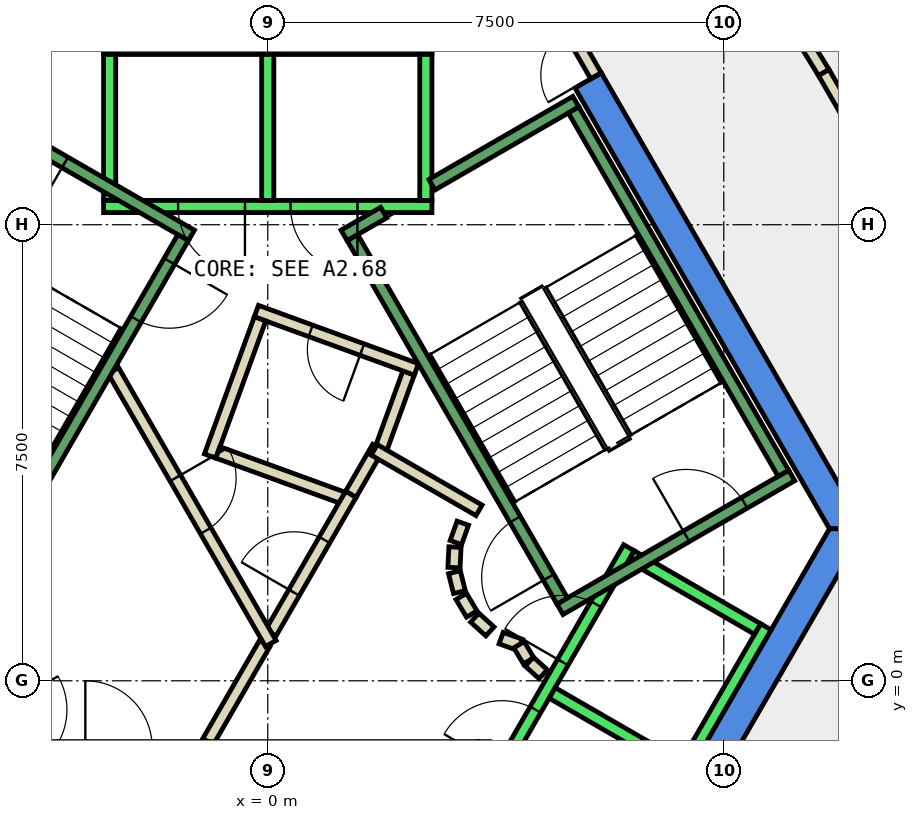
"""IFC4 building model, lengths in metres.
Left out: names, types, materials, properties, quantities, classifications, styles, units other than length and angle.
Written with IfcOpenShell. Run it as: python <this file> out.ifc"""

import sys

from ifc_helpers import new_model, si_unit, direction, frame, frame_2d, origin, place, context, subcontext, project, spatial, polyline, rectangle, outline, extrude, element, fill, save


model = new_model("IFC4")
c1 = context("Model", 3, precision=1e-05, world=origin(), true_north=direction((0.0, 1.0)))
c2 = subcontext(c1, "Body", "Model", "MODEL_VIEW")
j1 = project(units=[si_unit("LENGTHUNIT", "METRE"), si_unit("PLANEANGLEUNIT", "RADIAN")], contexts=[c1])
p1 = place(None, origin())
s1 = spatial("IfcSite", under=j1, at=p1, CompositionType="ELEMENT")
p2 = place(p1, origin())
s2 = spatial("IfcBuilding", under=s1, at=p2, CompositionType="ELEMENT")
p3 = place(p2, frame((0.0, 0.0, 322.4)))
s3 = spatial("IfcBuildingStorey", under=s2, at=p3, CompositionType="ELEMENT", Elevation=322.4)
p4 = place(p3, frame((0.0, 0.0, -0.34)))
e1 = element("IfcWall", 1, at=p4, inside=s3, PredefinedType="SHEAR", context=c2, shape_type="SweptSolid", body=[
    extrude(outline(polyline([(5.486, 9.998), (5.053, 9.748), (9.238, 2.5), (9.815, 2.5), (5.486, 9.998)])), origin(), (0.0, 0.0, 1.0), 3.34),
])
p5 = place(p3, frame((0.0, 0.0, -0.34)))
e2 = element("IfcWall", 2, at=p5, inside=s3, PredefinedType="SHEAR", context=c2, shape_type="SweptSolid", body=[
    extrude(outline(polyline([(4.907, -6.0), (9.815, 2.5), (9.238, 2.5), (4.619, -5.5), (4.907, -6.0)])), origin(), (0.0, 0.0, 1.0), 3.34),
])
p6 = place(p3, frame((1.366, 3.066, 0.0), z_axis=(0.0, 0.0, 1.0), x_axis=(0.499698775601, 0.866199245938, 0.0)))
e3 = element("IfcWall", 3, at=p6, inside=s3, PredefinedType="PARTITIONING", context=c2, shape_type="SweptSolid", body=[
    extrude(rectangle(XDim=0.893, YDim=0.2, at=frame_2d((0.446, 0.0))), origin(), (0.0, 0.0, 1.0), 3.0),
])
p7 = place(p3, frame((1.838, 3.748, 0.0), z_axis=(0.0, 0.0, 1.0), x_axis=(0.341883255813, 0.939742432475, 0.0)))
e4 = element("IfcWall", 4, at=p7, inside=s3, PredefinedType="PARTITIONING", context=c2, shape_type="SweptSolid", body=[
    extrude(rectangle(XDim=1.398, YDim=0.2, at=frame_2d((0.699, 0.0))), origin(), (0.0, 0.0, 1.0), 3.0),
])
p8 = place(p3, frame((2.444, 5.122, 0.0), z_axis=(0.0, 0.0, 1.0), x_axis=(-0.939650782256, 0.342135071873, 0.0)))
e5 = element("IfcWall", 5, at=p8, inside=s3, PredefinedType="PARTITIONING", context=c2, shape_type="SweptSolid", body=[
    extrude(rectangle(XDim=2.8, YDim=0.2, at=frame_2d((1.4, 0.0))), origin(), (0.0, 0.0, 1.0), 3.0),
])
p9 = place(p8, frame((0.95, 0.0, 0.0)))
e6 = element("IfcOpeningElement", 6, at=p9, cuts=e5, PredefinedType="OPENING", context=c2, shape_type="SweptSolid", body=[
    extrude(rectangle(XDim=0.9, YDim=2.1, at=frame_2d((0.45, 1.05))), frame((0.0, 0.11, 0.0), z_axis=(0.0, -1.0, 0.0), x_axis=(1.0, 0.0, 0.0)), (0.0, 0.0, 1.0), 0.22),
])
p10 = place(p3, frame((-0.127, 5.952, 0.0), z_axis=(0.0, 0.0, 1.0), x_axis=(-0.342012513308, -0.93969539785, 0.0)))
e7 = element("IfcWall", 7, at=p10, inside=s3, PredefinedType="PARTITIONING", context=c2, shape_type="SweptSolid", body=[
    extrude(rectangle(XDim=2.401, YDim=0.2, at=frame_2d((1.2, 0.0))), origin(), (0.0, 0.0, 1.0), 3.0),
])
p11 = place(p3, frame((-0.82, 3.756, 0.0), z_axis=(0.0, 0.0, 1.0), x_axis=(0.939740098492, -0.34188967122, 0.0)))
e8 = element("IfcWall", 8, at=p11, inside=s3, PredefinedType="PARTITIONING", context=c2, shape_type="SweptSolid", body=[
    extrude(rectangle(XDim=2.273, YDim=0.2, at=frame_2d((1.136, 0.0))), origin(), (0.0, 0.0, 1.0), 3.0),
])
p12 = place(p3, frame((4.922, 16.867, 0.0), z_axis=(0.0, 0.0, 1.0), x_axis=(0.523943621984, -0.851752945978, 0.0)))
e9 = element("IfcWall", 9, at=p12, inside=s3, PredefinedType="PARTITIONING", context=c2, shape_type="SweptSolid", body=[
    extrude(rectangle(XDim=8.06, YDim=0.2, at=frame_2d((4.03, 0.0))), origin(), (0.0, 0.0, 1.0), 3.0),
])
p13 = place(p3, frame((9.145, 10.002, 0.0), z_axis=(0.0, 0.0, 1.0), x_axis=(0.499798886082, -0.866141485827, 0.0)))
e10 = element("IfcWall", 10, at=p13, inside=s3, PredefinedType="PARTITIONING", context=c2, shape_type="SweptSolid", body=[
    extrude(rectangle(XDim=1.198, YDim=0.2, at=frame_2d((0.599, 0.0))), origin(), (0.0, 0.0, 1.0), 3.0),
])
p14 = place(p3, frame((-0.982, -1.0, 0.0), z_axis=(0.0, 0.0, 1.0), x_axis=(0.50024047865, 0.865886518847, 0.0)))
e11 = element("IfcWall", 11, at=p14, inside=s3, PredefinedType="PARTITIONING", context=c2, shape_type="SweptSolid", body=[
    extrude(rectangle(XDim=1.863, YDim=0.2, at=frame_2d((0.931, 0.0))), origin(), (0.0, 0.0, 1.0), 3.0),
])
p15 = place(p3, frame((0.05, 0.787, 0.0), z_axis=(0.0, 0.0, 1.0), x_axis=(0.500070457302, 0.865984721421, 0.0)))
e12 = element("IfcWall", 12, at=p15, inside=s3, PredefinedType="PARTITIONING", context=c2, shape_type="SweptSolid", body=[
    extrude(rectangle(XDim=2.631, YDim=0.2, at=frame_2d((1.316, 0.0))), origin(), (0.0, 0.0, 1.0), 3.0),
])
p16 = place(p15, frame((0.766, 0.0, 0.0)))
e13 = element("IfcOpeningElement", 13, at=p16, cuts=e12, PredefinedType="OPENING", context=c2, shape_type="SweptSolid", body=[
    extrude(rectangle(XDim=1.0, YDim=2.1, at=frame_2d((0.5, 1.05))), frame((0.0, 0.11, 0.0), z_axis=(0.0, -1.0, 0.0), x_axis=(1.0, 0.0, 0.0)), (0.0, 0.0, 1.0), 0.22),
])
p17 = place(p3, frame((1.751, 3.798, 0.0), z_axis=(0.0, 0.0, 1.0), x_axis=(0.866091650241, -0.499885240213, 0.0)))
e14 = element("IfcWall", 14, at=p17, inside=s3, PredefinedType="PARTITIONING", context=c2, shape_type="SweptSolid", body=[
    extrude(rectangle(XDim=1.991, YDim=0.2, at=frame_2d((0.995, 0.0))), origin(), (0.0, 0.0, 1.0), 3.0),
])
p18 = place(p3, frame((3.208, 2.592, 0.0), z_axis=(0.0, 0.0, 1.0), x_axis=(-0.337388820924, -0.941365382578, 0.0)))
e15 = element("IfcWall", 15, at=p18, inside=s3, PredefinedType="PARTITIONING", context=c2, shape_type="SweptSolid", body=[
    extrude(rectangle(XDim=0.338, YDim=0.2, at=frame_2d((0.169, 0.0))), origin(), (0.0, 0.0, 1.0), 3.0),
])
p19 = place(p3, frame((3.079, 2.199, 0.0), z_axis=(0.0, 0.0, 1.0), x_axis=(-0.047771483479, -0.998858290933, 0.0)))
e16 = element("IfcWall", 16, at=p19, inside=s3, PredefinedType="PARTITIONING", context=c2, shape_type="SweptSolid", body=[
    extrude(rectangle(XDim=0.337, YDim=0.2, at=frame_2d((0.169, 0.0))), origin(), (0.0, 0.0, 1.0), 3.0),
])
p20 = place(p3, frame((3.07, 1.786, 0.0), z_axis=(0.0, 0.0, 1.0), x_axis=(0.242705583207, -0.970099994784, 0.0)))
e17 = element("IfcWall", 17, at=p20, inside=s3, PredefinedType="PARTITIONING", context=c2, shape_type="SweptSolid", body=[
    extrude(rectangle(XDim=0.338, YDim=0.2, at=frame_2d((0.169, 0.0))), origin(), (0.0, 0.0, 1.0), 3.0),
])
for number, where, z_axis, x_axis in (
    (18, (3.182, 1.388, 0.0), (0.0, 0.0, 1.0), (0.512, -0.859, 0.0)),
    (19, (3.404, 1.039, 0.0), (0.0, 0.0, 1.0), (0.74, -0.672, 0.0)),
):
    element("IfcWall", number, at=place(p3, frame(where, z_axis=z_axis, x_axis=x_axis)), inside=s3, PredefinedType="PARTITIONING", context=c2, shape_type="SweptSolid", body=[
        extrude(rectangle(XDim=0.338, YDim=0.2, at=frame_2d((0.169, 0.0))), origin(), (0.0, 0.0, 1.0), 3.0),
    ])
p21 = place(p3, frame((3.838, 0.702, 0.0), z_axis=(0.0, 0.0, 1.0), x_axis=(0.941035081519, -0.338308993895, 0.0)))
e20 = element("IfcWall", 20, at=p21, inside=s3, PredefinedType="PARTITIONING", context=c2, shape_type="SweptSolid", body=[
    extrude(rectangle(XDim=0.337, YDim=0.2, at=frame_2d((0.168, 0.0))), origin(), (0.0, 0.0, 1.0), 3.0),
])
p22 = place(p3, frame((4.132, 0.593, 0.0), z_axis=(0.0, 0.0, 1.0), x_axis=(0.513561617048, -0.858052717201, 0.0)))
e21 = element("IfcWall", 21, at=p22, inside=s3, PredefinedType="PARTITIONING", context=c2, shape_type="SweptSolid", body=[
    extrude(rectangle(XDim=0.308, YDim=0.2, at=frame_2d((0.154, 0.0))), origin(), (0.0, 0.0, 1.0), 3.0),
])
p23 = place(p3, frame((4.301, 0.315, 0.0), z_axis=(0.0, 0.0, 1.0), x_axis=(0.741798017506, -0.670623367639, 0.0)))
e22 = element("IfcWall", 22, at=p23, inside=s3, PredefinedType="PARTITIONING", context=c2, shape_type="SweptSolid", body=[
    extrude(rectangle(XDim=0.309, YDim=0.2, at=frame_2d((0.154, 0.0))), origin(), (0.0, 0.0, 1.0), 3.0),
])
p24 = place(p3, frame((-2.54, 5.1, 0.0), z_axis=(0.0, 0.0, 1.0), x_axis=(0.499925051871, -0.866068670783, 0.0)))
e23 = element("IfcWall", 23, at=p24, inside=s3, PredefinedType="PARTITIONING", context=c2, shape_type="SweptSolid", body=[
    extrude(rectangle(XDim=5.181, YDim=0.2, at=frame_2d((2.59, 0.0))), origin(), (0.0, 0.0, 1.0), 3.0),
])
p25 = place(p24, frame((2.04, 0.0, 0.0)))
e24 = element("IfcOpeningElement", 24, at=p25, cuts=e23, PredefinedType="OPENING", context=c2, shape_type="SweptSolid", body=[
    extrude(rectangle(XDim=1.0, YDim=2.1, at=frame_2d((0.5, 1.05))), frame((0.0, 0.11, 0.0), z_axis=(0.0, -1.0, 0.0), x_axis=(1.0, 0.0, 0.0)), (0.0, 0.0, 1.0), 0.22),
])
p26 = place(p3, frame((5.399, 9.948, 0.0), z_axis=(0.0, 0.0, 1.0), x_axis=(-0.499882215713, 0.866093395895, 0.0)))
e25 = element("IfcWall", 25, at=p26, inside=s3, PredefinedType="PARTITIONING", context=c2, shape_type="SweptSolid", body=[
    extrude(rectangle(XDim=0.926, YDim=0.2, at=frame_2d((0.463, 0.0))), origin(), (0.0, 0.0, 1.0), 2.4),
])
p27 = place(p26, frame((0.017, 0.0, 0.0)))
e26 = element("IfcOpeningElement", 26, at=p27, cuts=e25, PredefinedType="OPENING", context=c2, shape_type="SweptSolid", body=[
    extrude(rectangle(XDim=0.9, YDim=2.1, at=frame_2d((0.45, 1.05))), frame((0.0, 0.11, 0.0), z_axis=(0.0, -1.0, 0.0), x_axis=(1.0, 0.0, 0.0)), (0.0, 0.0, 1.0), 0.22),
])
p28 = place(p3, frame((2.7, 7.8, 0.0), z_axis=(0.0, 0.0, 1.0), x_axis=(-1.0, 0.0, 0.0)))
e27 = element("IfcWall", 27, at=p28, inside=s3, PredefinedType="STANDARD", context=c2, shape_type="SweptSolid", body=[
    extrude(rectangle(XDim=5.4, YDim=0.2, at=frame_2d((2.7, 0.0))), origin(), (0.0, 0.0, 1.0), 3.0),
])
p29 = place(p28, frame((1.225, 0.0, 0.0)))
e28 = element("IfcOpeningElement", 28, at=p29, cuts=e27, PredefinedType="OPENING", context=c2, shape_type="SweptSolid", body=[
    extrude(rectangle(XDim=1.1, YDim=2.1, at=frame_2d((0.55, 1.05))), frame((0.0, 0.11, 0.0), z_axis=(0.0, -1.0, 0.0), x_axis=(1.0, 0.0, 0.0)), (0.0, 0.0, 1.0), 0.22),
])
p30 = place(p28, frame((3.075, 0.0, 0.0)))
e29 = element("IfcOpeningElement", 29, at=p30, cuts=e27, PredefinedType="OPENING", context=c2, shape_type="SweptSolid", body=[
    extrude(rectangle(XDim=1.1, YDim=2.1, at=frame_2d((0.55, 1.05))), frame((0.0, 0.11, 0.0), z_axis=(0.0, -1.0, 0.0), x_axis=(1.0, 0.0, 0.0)), (0.0, 0.0, 1.0), 0.22),
])
p31 = place(p3, frame((2.7, 10.4, 0.0), z_axis=(0.0, 0.0, 1.0), x_axis=(-1.0, 0.0, 0.0)))
e30 = element("IfcWall", 30, at=p31, inside=s3, PredefinedType="STANDARD", context=c2, shape_type="SweptSolid", body=[
    extrude(rectangle(XDim=5.4, YDim=0.2, at=frame_2d((2.7, 0.0))), origin(), (0.0, 0.0, 1.0), 3.0),
])
for number, where, z_axis, x_axis in (
    (31, (2.6, 7.9, 0.0), (0.0, 0.0, 1.0), (0.0, 1.0, 0.0)),
    (32, (0.0, 7.9, 0.0), (0.0, 0.0, 1.0), (0.0, 1.0, 0.0)),
    (33, (-2.6, 7.9, 0.0), (0.0, 0.0, 1.0), (0.0, 1.0, 0.0)),
):
    element("IfcWall", number, at=place(p3, frame(where, z_axis=z_axis, x_axis=x_axis)), inside=s3, PredefinedType="STANDARD", context=c2, shape_type="SweptSolid", body=[
        extrude(rectangle(XDim=2.4, YDim=0.2, at=frame_2d((1.2, 0.0))), origin(), (0.0, 0.0, 1.0), 3.0),
    ])
p32 = place(p3, frame((-5.94, 2.188, 0.0), z_axis=(0.0, 0.0, 1.0), x_axis=(0.500034260056, -0.866005622828, 0.0)))
e34 = element("IfcWall", 34, at=p32, inside=s3, PredefinedType="STANDARD", context=c2, shape_type="SweptSolid", body=[
    extrude(rectangle(XDim=5.399, YDim=0.2, at=frame_2d((2.7, 0.0))), origin(), (0.0, 0.0, 1.0), 3.0),
])
p33 = place(p32, frame((3.075, 0.0, 0.0)))
e35 = element("IfcOpeningElement", 35, at=p33, cuts=e34, PredefinedType="OPENING", context=c2, shape_type="SweptSolid", body=[
    extrude(rectangle(XDim=1.1, YDim=2.1, at=frame_2d((0.55, 1.05))), frame((0.0, 0.11, 0.0), z_axis=(0.0, -1.0, 0.0), x_axis=(1.0, 0.0, 0.0)), (0.0, 0.0, 1.0), 0.22),
])
p34 = place(p32, frame((1.225, 0.0, 0.0)))
e36 = element("IfcOpeningElement", 36, at=p34, cuts=e34, PredefinedType="OPENING", context=c2, shape_type="SweptSolid", body=[
    extrude(rectangle(XDim=1.1, YDim=2.1, at=frame_2d((0.55, 1.05))), frame((0.0, 0.11, 0.0), z_axis=(0.0, -1.0, 0.0), x_axis=(1.0, 0.0, 0.0)), (0.0, 0.0, 1.0), 0.22),
])
p35 = place(p3, frame((3.24, -2.488, 0.0), z_axis=(0.0, 0.0, 1.0), x_axis=(0.500034260056, 0.866005622828, 0.0)))
e37 = element("IfcWall", 37, at=p35, inside=s3, PredefinedType="STANDARD", context=c2, shape_type="SweptSolid", body=[
    extrude(rectangle(XDim=5.399, YDim=0.2, at=frame_2d((2.7, 0.0))), origin(), (0.0, 0.0, 1.0), 3.0),
])
p36 = place(p35, frame((3.225, 0.0, 0.0)))
e38 = element("IfcOpeningElement", 38, at=p36, cuts=e37, PredefinedType="OPENING", context=c2, shape_type="SweptSolid", body=[
    extrude(rectangle(XDim=1.1, YDim=2.1, at=frame_2d((0.55, 1.05))), frame((0.0, 0.11, 0.0), z_axis=(0.0, -1.0, 0.0), x_axis=(1.0, 0.0, 0.0)), (0.0, 0.0, 1.0), 0.22),
])
p37 = place(p35, frame((1.225, 0.0, 0.0)))
e39 = element("IfcOpeningElement", 39, at=p37, cuts=e37, PredefinedType="OPENING", context=c2, shape_type="SweptSolid", body=[
    extrude(rectangle(XDim=1.1, YDim=2.1, at=frame_2d((0.55, 1.05))), frame((0.0, 0.11, 0.0), z_axis=(0.0, -1.0, 0.0), x_axis=(1.0, 0.0, 0.0)), (0.0, 0.0, 1.0), 0.22),
])
p38 = place(p3, frame((5.492, -3.788, 0.0), z_axis=(0.0, 0.0, 1.0), x_axis=(0.500034260056, 0.866005622828, 0.0)))
e40 = element("IfcWall", 40, at=p38, inside=s3, PredefinedType="STANDARD", context=c2, shape_type="SweptSolid", body=[
    extrude(rectangle(XDim=5.399, YDim=0.2, at=frame_2d((2.7, 0.0))), origin(), (0.0, 0.0, 1.0), 3.0),
])
for number, where, z_axis, x_axis in (
    (41, (4.677, -0.2, 0.0), (0.0, 0.0, 1.0), (0.866, -0.5, 0.0)),
    (42, (5.977, 2.052, 0.0), (0.0, 0.0, 1.0), (0.866, -0.5, 0.0)),
):
    element("IfcWall", number, at=place(p3, frame(where, z_axis=z_axis, x_axis=x_axis)), inside=s3, PredefinedType="STANDARD", context=c2, shape_type="SweptSolid", body=[
        extrude(rectangle(XDim=2.399, YDim=0.2, at=frame_2d((1.2, 0.0))), origin(), (0.0, 0.0, 1.0), 3.0),
    ])
p39 = place(p3, frame((4.806, 1.176, 0.0), z_axis=(0.0, 0.0, 1.0), x_axis=(0.866059941101, 0.499940174841, 0.0)))
e43 = element("IfcWall", 43, at=p39, inside=s3, PredefinedType="STANDARD", context=c2, shape_type="SweptSolid", body=[
    extrude(rectangle(XDim=4.4, YDim=0.2, at=frame_2d((2.2, 0.0))), origin(), (0.0, 0.0, 1.0), 3.0),
])
p40 = place(p39, frame((2.4, 0.0, 0.0)))
e44 = element("IfcOpeningElement", 44, at=p40, cuts=e43, PredefinedType="OPENING", context=c2, shape_type="SweptSolid", body=[
    extrude(rectangle(XDim=1.1, YDim=2.2, at=frame_2d((0.55, 1.1))), frame((0.0, 0.11, 0.0), z_axis=(0.0, -1.0, 0.0), x_axis=(1.0, 0.0, 0.0)), (0.0, 0.0, 1.0), 0.22),
])
p41 = place(p3, frame((2.7, 8.158, 0.0), z_axis=(0.0, 0.0, 1.0), x_axis=(0.86611865017, 0.499838457731, 0.0)))
e45 = element("IfcWall", 45, at=p41, inside=s3, PredefinedType="STANDARD", context=c2, shape_type="SweptSolid", body=[
    extrude(rectangle(XDim=2.733, YDim=0.2, at=frame_2d((1.366, 0.0))), origin(), (0.0, 0.0, 1.0), 3.0),
])
p42 = place(p3, frame((1.256, 7.324, 0.0), z_axis=(0.0, 0.0, 1.0), x_axis=(0.865915093549, 0.500191014278, 0.0)))
e46 = element("IfcWall", 46, at=p42, inside=s3, PredefinedType="STANDARD", context=c2, shape_type="SweptSolid", body=[
    extrude(rectangle(XDim=0.752, YDim=0.2, at=frame_2d((0.376, 0.0))), origin(), (0.0, 0.0, 1.0), 3.0),
])
p43 = place(p3, frame((4.843, 1.312, 0.0), z_axis=(0.0, 0.0, 1.0), x_axis=(-0.499963383562, 0.866046543262, 0.0)))
e47 = element("IfcWall", 47, at=p43, inside=s3, PredefinedType="STANDARD", context=c2, shape_type="SweptSolid", body=[
    extrude(rectangle(XDim=6.9, YDim=0.2, at=frame_2d((3.45, 0.0))), origin(), (0.0, 0.0, 1.0), 3.0),
])
p44 = place(p43, frame((0.45, 0.0, 0.0)))
e48 = element("IfcOpeningElement", 48, at=p44, cuts=e47, PredefinedType="OPENING", context=c2, shape_type="SweptSolid", body=[
    extrude(rectangle(XDim=1.1, YDim=2.2, at=frame_2d((0.55, 1.1))), frame((0.0, 0.11, 0.0), z_axis=(0.0, -1.0, 0.0), x_axis=(1.0, 0.0, 0.0)), (0.0, 0.0, 1.0), 0.22),
])
p45 = place(p3, frame((8.48, 3.412, 0.0), z_axis=(0.0, 0.0, 1.0), x_axis=(-0.499978703459, 0.866037698999, 0.0)))
e49 = element("IfcWall", 49, at=p45, inside=s3, PredefinedType="STANDARD", context=c2, shape_type="SweptSolid", body=[
    extrude(rectangle(XDim=6.9, YDim=0.2, at=frame_2d((3.45, 0.0))), origin(), (0.0, 0.0, 1.0), 3.0),
])
p46 = place(p3, frame((-1.256, 7.324, 0.0), z_axis=(0.0, 0.0, 1.0), x_axis=(-0.866046073146, 0.499964197906, 0.0)))
e50 = element("IfcWall", 50, at=p46, inside=s3, PredefinedType="STANDARD", context=c2, shape_type="SweptSolid", body=[
    extrude(rectangle(XDim=4.4, YDim=0.2, at=frame_2d((2.2, 0.0))), origin(), (0.0, 0.0, 1.0), 3.0),
])
p47 = place(p46, frame((2.4, 0.0, 0.0)))
e51 = element("IfcOpeningElement", 51, at=p47, cuts=e50, PredefinedType="OPENING", context=c2, shape_type="SweptSolid", body=[
    extrude(rectangle(XDim=1.1, YDim=2.2, at=frame_2d((0.55, 1.1))), frame((0.0, 0.11, 0.0), z_axis=(0.0, -1.0, 0.0), x_axis=(1.0, 0.0, 0.0)), (0.0, 0.0, 1.0), 0.22),
])
p48 = place(p3, frame((-1.393, 7.288, 0.0), z_axis=(0.0, 0.0, 1.0), x_axis=(-0.499963383562, -0.866046543262, 0.0)))
e52 = element("IfcWall", 52, at=p48, inside=s3, PredefinedType="STANDARD", context=c2, shape_type="SweptSolid", body=[
    extrude(rectangle(XDim=6.9, YDim=0.2, at=frame_2d((3.45, 0.0))), origin(), (0.0, 0.0, 1.0), 3.0),
])
p49 = place(p48, frame((0.45, 0.0, 0.0)))
e53 = element("IfcOpeningElement", 53, at=p49, cuts=e52, PredefinedType="OPENING", context=c2, shape_type="SweptSolid", body=[
    extrude(rectangle(XDim=1.1, YDim=2.2, at=frame_2d((0.55, 1.1))), frame((0.0, 0.11, 0.0), z_axis=(0.0, -1.0, 0.0), x_axis=(1.0, 0.0, 0.0)), (0.0, 0.0, 1.0), 0.22),
])
p50 = place(p16, origin())
e54 = element("IfcDoor", 54, at=p50, inside=s3, OperationType="SINGLE_SWING_RIGHT", PredefinedType="DOOR", context=c2, shape_type="SweptSolid", body=[
    extrude(rectangle(XDim=1.0, YDim=2.1, at=frame_2d((0.5, 1.05))), frame((0.0, 0.025, 0.0), z_axis=(0.0, -1.0, 0.0), x_axis=(1.0, 0.0, 0.0)), (0.0, 0.0, 1.0), 0.05),
])
fill(e13, e54)
p51 = place(p25, origin())
e55 = element("IfcDoor", 55, at=p51, inside=s3, OperationType="SINGLE_SWING_RIGHT", PredefinedType="DOOR", context=c2, shape_type="SweptSolid", body=[
    extrude(rectangle(XDim=1.0, YDim=2.1, at=frame_2d((0.5, 1.05))), frame((0.0, 0.025, 0.0), z_axis=(0.0, -1.0, 0.0), x_axis=(1.0, 0.0, 0.0)), (0.0, 0.0, 1.0), 0.05),
])
fill(e24, e55)
p52 = place(p9, origin())
e56 = element("IfcDoor", 56, at=p52, inside=s3, OperationType="SINGLE_SWING_LEFT", PredefinedType="DOOR", context=c2, shape_type="SweptSolid", body=[
    extrude(rectangle(XDim=0.9, YDim=2.1, at=frame_2d((0.45, 1.05))), frame((0.0, 0.025, 0.0), z_axis=(0.0, -1.0, 0.0), x_axis=(1.0, 0.0, 0.0)), (0.0, 0.0, 1.0), 0.05),
])
fill(e6, e56)
p53 = place(p27, origin())
e57 = element("IfcDoor", 57, at=p53, inside=s3, OperationType="SINGLE_SWING_LEFT", PredefinedType="DOOR", context=c2, shape_type="SweptSolid", body=[
    extrude(rectangle(XDim=0.9, YDim=2.1, at=frame_2d((0.45, 1.05))), frame((0.0, 0.025, 0.0), z_axis=(0.0, -1.0, 0.0), x_axis=(1.0, 0.0, 0.0)), (0.0, 0.0, 1.0), 0.05),
])
fill(e26, e57)
p54 = place(p29, origin())
e58 = element("IfcDoor", 58, at=p54, inside=s3, OperationType="SLIDING_TO_LEFT", PredefinedType="DOOR", context=c2, shape_type="SweptSolid", body=[
    extrude(rectangle(XDim=1.1, YDim=2.1, at=frame_2d((0.55, 1.05))), frame((0.0, 0.025, 0.0), z_axis=(0.0, -1.0, 0.0), x_axis=(1.0, 0.0, 0.0)), (0.0, 0.0, 1.0), 0.05),
])
fill(e28, e58)
p55 = place(p30, origin())
e59 = element("IfcDoor", 59, at=p55, inside=s3, OperationType="SLIDING_TO_LEFT", PredefinedType="DOOR", context=c2, shape_type="SweptSolid", body=[
    extrude(rectangle(XDim=1.1, YDim=2.1, at=frame_2d((0.55, 1.05))), frame((0.0, 0.025, 0.0), z_axis=(0.0, -1.0, 0.0), x_axis=(1.0, 0.0, 0.0)), (0.0, 0.0, 1.0), 0.05),
])
fill(e29, e59)
p56 = place(p36, origin())
e60 = element("IfcDoor", 60, at=p56, inside=s3, OperationType="SLIDING_TO_LEFT", PredefinedType="DOOR", context=c2, shape_type="SweptSolid", body=[
    extrude(rectangle(XDim=1.1, YDim=2.1, at=frame_2d((0.55, 1.05))), frame((0.0, 0.025, 0.0), z_axis=(0.0, -1.0, 0.0), x_axis=(1.0, 0.0, 0.0)), (0.0, 0.0, 1.0), 0.05),
])
fill(e38, e60)
p57 = place(p37, origin())
e61 = element("IfcDoor", 61, at=p57, inside=s3, OperationType="SLIDING_TO_LEFT", PredefinedType="DOOR", context=c2, shape_type="SweptSolid", body=[
    extrude(rectangle(XDim=1.1, YDim=2.1, at=frame_2d((0.55, 1.05))), frame((0.0, 0.025, 0.0), z_axis=(0.0, -1.0, 0.0), x_axis=(1.0, 0.0, 0.0)), (0.0, 0.0, 1.0), 0.05),
])
fill(e39, e61)
p58 = place(p44, origin())
e62 = element("IfcDoor", 62, at=p58, inside=s3, OperationType="SINGLE_SWING_LEFT", PredefinedType="DOOR", context=c2, shape_type="SweptSolid", body=[
    extrude(rectangle(XDim=1.1, YDim=2.2, at=frame_2d((0.55, 1.1))), frame((0.0, 0.025, 0.0), z_axis=(0.0, -1.0, 0.0), x_axis=(1.0, 0.0, 0.0)), (0.0, 0.0, 1.0), 0.05),
])
fill(e48, e62)
p59 = place(p40, origin())
e63 = element("IfcDoor", 63, at=p59, inside=s3, OperationType="SINGLE_SWING_LEFT", PredefinedType="DOOR", context=c2, shape_type="SweptSolid", body=[
    extrude(rectangle(XDim=1.1, YDim=2.2, at=frame_2d((0.55, 1.1))), frame((0.0, 0.025, 0.0), z_axis=(0.0, -1.0, 0.0), x_axis=(1.0, 0.0, 0.0)), (0.0, 0.0, 1.0), 0.05),
])
fill(e44, e63)
p60 = place(p49, origin())
e64 = element("IfcDoor", 64, at=p60, inside=s3, OperationType="SINGLE_SWING_LEFT", PredefinedType="DOOR", context=c2, shape_type="SweptSolid", body=[
    extrude(rectangle(XDim=1.1, YDim=2.2, at=frame_2d((0.55, 1.1))), frame((0.0, 0.025, 0.0), z_axis=(0.0, -1.0, 0.0), x_axis=(1.0, 0.0, 0.0)), (0.0, 0.0, 1.0), 0.05),
])
fill(e53, e64)
p61 = place(p47, origin())
e65 = element("IfcDoor", 65, at=p61, inside=s3, OperationType="SINGLE_SWING_LEFT", PredefinedType="DOOR", context=c2, shape_type="SweptSolid", body=[
    extrude(rectangle(XDim=1.1, YDim=2.2, at=frame_2d((0.55, 1.1))), frame((0.0, 0.025, 0.0), z_axis=(0.0, -1.0, 0.0), x_axis=(1.0, 0.0, 0.0)), (0.0, 0.0, 1.0), 0.05),
])
fill(e51, e65)
save(model, sys.argv[1])
